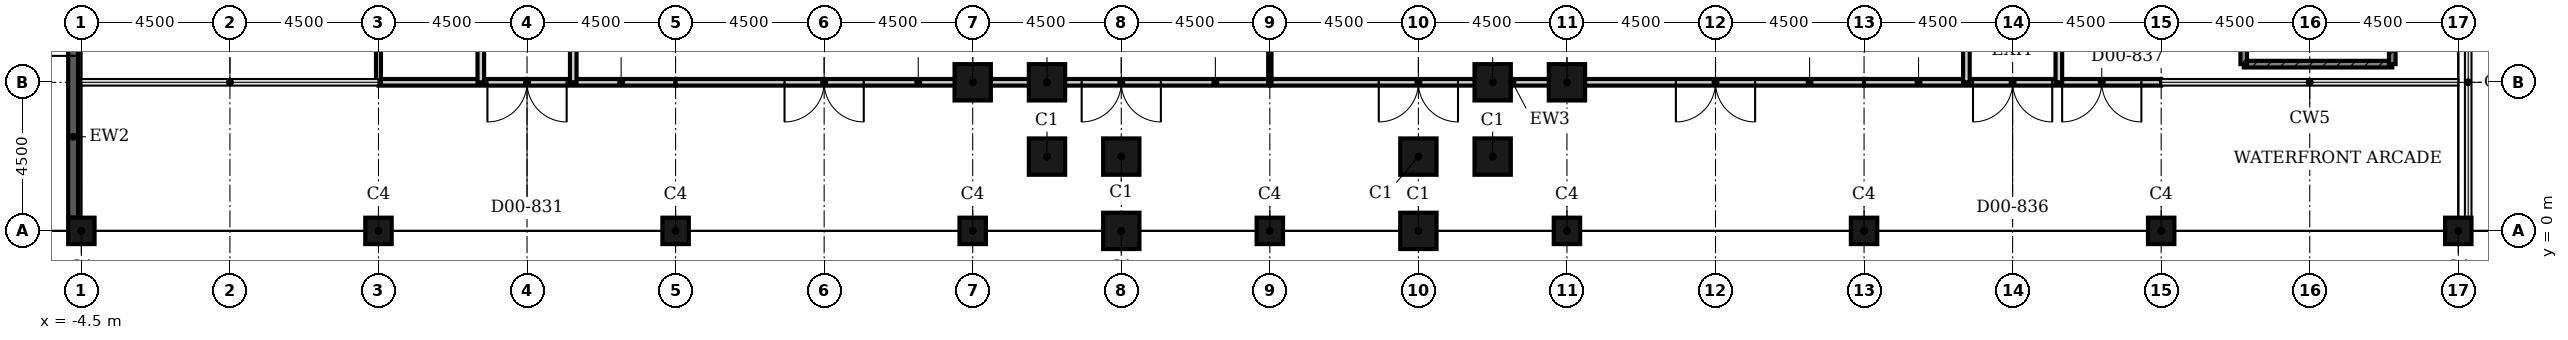
"""IFC4 building model, lengths in metres.
Left out: names, types, materials, properties, quantities, classifications, styles, units other than length and angle.
Written with IfcOpenShell. Run it as: python <this file> out.ifc"""

import sys

from ifc_helpers import new_model, si_unit, direction, frame, frame_2d, origin, origin_2d, place, context, subcontext, project, spatial, rectangle, hollow_rectangle, extrude, element, fill, save


model = new_model("IFC4")
c1 = context("Model", 3, precision=1e-05, world=origin(), true_north=direction((0.0, 1.0)))
c2 = subcontext(c1, "Body", "Model", "MODEL_VIEW")
j1 = project(units=[si_unit("LENGTHUNIT", "METRE"), si_unit("PLANEANGLEUNIT", "RADIAN")], contexts=[c1])
p1 = place(None, origin())
s1 = spatial("IfcSite", under=j1, at=p1, CompositionType="ELEMENT")
p2 = place(p1, origin())
s2 = spatial("IfcBuilding", under=s1, at=p2, CompositionType="ELEMENT")
p3 = place(p2, origin())
s3 = spatial("IfcBuildingStorey", under=s2, at=p3, CompositionType="ELEMENT", Elevation=0.0)
for number, where, z_axis, x_axis in (
    (1, (22.5, 4.5, 0.0), (0.0, 0.0, 1.0), (1.0, 0.0, 0.0)),
    (2, (24.75, 4.5, 0.0), (0.0, 0.0, 1.0), (1.0, 0.0, 0.0)),
    (3, (24.75, 2.25, 0.0), (0.0, 0.0, 1.0), (1.0, 0.0, 0.0)),
    (4, (27.0, 2.25, 0.0), (0.0, 0.0, 1.0), (1.0, 0.0, 0.0)),
    (5, (27.0, 0.0, 0.0), (0.0, 0.0, 1.0), (1.0, 0.0, 0.0)),
    (6, (36.0, 0.0, 0.0), (0.0, 0.0, 1.0), (1.0, 0.0, 0.0)),
    (7, (36.0, 2.25, 0.0), (0.0, 0.0, 1.0), (1.0, 0.0, 0.0)),
    (8, (38.25, 2.25, 0.0), (0.0, 0.0, 1.0), (1.0, 0.0, 0.0)),
    (9, (38.25, 4.5, 0.0), (0.0, 0.0, 1.0), (1.0, 0.0, 0.0)),
    (10, (40.5, 4.5, 0.0), (0.0, 0.0, 1.0), (1.0, 0.0, 0.0)),
):
    element("IfcColumn", number, at=place(p3, frame(where, z_axis=z_axis, x_axis=x_axis)), inside=s3, PredefinedType="COLUMN", context=c2, shape_type="SweptSolid", body=[
        extrude(hollow_rectangle(XDim=1.1, YDim=1.1, WallThickness=0.036, at=origin_2d()), origin(), (0.0, 0.0, 1.0), 6.6),
    ])
for number, where, z_axis, x_axis in (
    (11, (-4.5, 0.0, 0.0), (0.0, 0.0, 1.0), (1.0, 0.0, 0.0)),
    (12, (4.5, 0.0, 0.0), (0.0, 0.0, 1.0), (1.0, 0.0, 0.0)),
    (13, (13.5, 0.0, 0.0), (0.0, 0.0, 1.0), (1.0, 0.0, 0.0)),
    (14, (22.5, 0.0, 0.0), (0.0, 0.0, 1.0), (1.0, 0.0, 0.0)),
    (15, (31.5, 0.0, 0.0), (0.0, 0.0, 1.0), (1.0, 0.0, 0.0)),
    (16, (40.5, 0.0, 0.0), (0.0, 0.0, 1.0), (1.0, 0.0, 0.0)),
    (17, (49.5, 0.0, 0.0), (0.0, 0.0, 1.0), (1.0, 0.0, 0.0)),
    (18, (58.5, 0.0, 0.0), (0.0, 0.0, 1.0), (1.0, 0.0, 0.0)),
    (19, (67.5, 0.0, 0.0), (0.0, 0.0, 1.0), (1.0, 0.0, 0.0)),
):
    element("IfcColumn", number, at=place(p3, frame(where, z_axis=z_axis, x_axis=x_axis)), inside=s3, PredefinedType="COLUMN", context=c2, shape_type="SweptSolid", body=[
        extrude(hollow_rectangle(XDim=0.8, YDim=0.8, WallThickness=0.025, at=origin_2d()), origin(), (0.0, 0.0, 1.0), 6.6),
    ])
p4 = place(p3, frame((-4.75, 0.4, 0.0), z_axis=(0.0, 0.0, 1.0), x_axis=(0.0, 1.0, 0.0)))
e20 = element("IfcWall", 20, at=p4, inside=s3, PredefinedType="SOLIDWALL", context=c2, shape_type="SweptSolid", body=[
    extrude(rectangle(XDim=8.2, YDim=0.3, at=frame_2d((4.1, 0.0))), origin(), (0.0, 0.0, 1.0), 6.6),
])
p5 = place(p4, frame((4.9, 0.0, 0.0)))
e21 = element("IfcOpeningElement", 21, at=p5, cuts=e20, PredefinedType="OPENING", context=c2, shape_type="SweptSolid", body=[
    extrude(rectangle(XDim=2.4, YDim=2.4, at=frame_2d((1.2, 1.2))), frame((0.0, 0.16, 0.0), z_axis=(0.0, -1.0, 0.0), x_axis=(1.0, 0.0, 0.0)), (0.0, 0.0, 1.0), 0.32),
])
p6 = place(p3, frame((13.5, 4.5, 0.0), z_axis=(0.0, 0.0, 1.0), x_axis=(-1.0, 0.0, 0.0)))
e22 = element("IfcWall", 22, at=p6, inside=s3, PredefinedType="SOLIDWALL", context=c2, shape_type="SweptSolid", body=[
    extrude(rectangle(XDim=9.0, YDim=0.2, at=frame_2d((4.5, 0.0))), origin(), (0.0, 0.0, 1.0), 6.25),
])
p7 = place(p6, frame((3.3, 0.0, 0.0)))
e23 = element("IfcOpeningElement", 23, at=p7, cuts=e22, PredefinedType="OPENING", context=c2, shape_type="SweptSolid", body=[
    extrude(rectangle(XDim=2.4, YDim=2.4, at=frame_2d((1.2, 1.2))), frame((0.0, 0.11, 0.0), z_axis=(0.0, -1.0, 0.0), x_axis=(1.0, 0.0, 0.0)), (0.0, 0.0, 1.0), 0.22),
])
p8 = place(p3, frame((22.5, 4.5, 0.0), z_axis=(0.0, 0.0, 1.0), x_axis=(-1.0, 0.0, 0.0)))
e24 = element("IfcWall", 24, at=p8, inside=s3, PredefinedType="SOLIDWALL", context=c2, shape_type="SweptSolid", body=[
    extrude(rectangle(XDim=9.0, YDim=0.2, at=frame_2d((4.5, 0.0))), origin(), (0.0, 0.0, 1.0), 6.25),
])
p9 = place(p8, frame((3.3, 0.0, 0.0)))
e25 = element("IfcOpeningElement", 25, at=p9, cuts=e24, PredefinedType="OPENING", context=c2, shape_type="SweptSolid", body=[
    extrude(rectangle(XDim=2.4, YDim=2.4, at=frame_2d((1.2, 1.2))), frame((0.0, 0.11, 0.0), z_axis=(0.0, -1.0, 0.0), x_axis=(1.0, 0.0, 0.0)), (0.0, 0.0, 1.0), 0.22),
])
p10 = place(p3, frame((31.5, 4.5, 0.0), z_axis=(0.0, 0.0, 1.0), x_axis=(-1.0, 0.0, 0.0)))
e26 = element("IfcWall", 26, at=p10, inside=s3, PredefinedType="SOLIDWALL", context=c2, shape_type="SweptSolid", body=[
    extrude(rectangle(XDim=9.0, YDim=0.2, at=frame_2d((4.5, 0.0))), origin(), (0.0, 0.0, 1.0), 6.25),
])
p11 = place(p10, frame((3.3, 0.0, 0.0)))
e27 = element("IfcOpeningElement", 27, at=p11, cuts=e26, PredefinedType="OPENING", context=c2, shape_type="SweptSolid", body=[
    extrude(rectangle(XDim=2.4, YDim=2.4, at=frame_2d((1.2, 1.2))), frame((0.0, 0.11, 0.0), z_axis=(0.0, -1.0, 0.0), x_axis=(1.0, 0.0, 0.0)), (0.0, 0.0, 1.0), 0.22),
])
p12 = place(p3, frame((40.5, 4.5, 0.0), z_axis=(0.0, 0.0, 1.0), x_axis=(-1.0, 0.0, 0.0)))
e28 = element("IfcWall", 28, at=p12, inside=s3, PredefinedType="SOLIDWALL", context=c2, shape_type="SweptSolid", body=[
    extrude(rectangle(XDim=9.0, YDim=0.2, at=frame_2d((4.5, 0.0))), origin(), (0.0, 0.0, 1.0), 6.25),
])
p13 = place(p12, frame((3.3, 0.0, 0.0)))
e29 = element("IfcOpeningElement", 29, at=p13, cuts=e28, PredefinedType="OPENING", context=c2, shape_type="SweptSolid", body=[
    extrude(rectangle(XDim=2.4, YDim=2.4, at=frame_2d((1.2, 1.2))), frame((0.0, 0.11, 0.0), z_axis=(0.0, -1.0, 0.0), x_axis=(1.0, 0.0, 0.0)), (0.0, 0.0, 1.0), 0.22),
])
p14 = place(p3, frame((49.5, 4.5, 0.0), z_axis=(0.0, 0.0, 1.0), x_axis=(-1.0, 0.0, 0.0)))
e30 = element("IfcWall", 30, at=p14, inside=s3, PredefinedType="SOLIDWALL", context=c2, shape_type="SweptSolid", body=[
    extrude(rectangle(XDim=9.0, YDim=0.2, at=frame_2d((4.5, 0.0))), origin(), (0.0, 0.0, 1.0), 6.25),
])
p15 = place(p14, frame((3.3, 0.0, 0.0)))
e31 = element("IfcOpeningElement", 31, at=p15, cuts=e30, PredefinedType="OPENING", context=c2, shape_type="SweptSolid", body=[
    extrude(rectangle(XDim=2.4, YDim=2.4, at=frame_2d((1.2, 1.2))), frame((0.0, 0.11, 0.0), z_axis=(0.0, -1.0, 0.0), x_axis=(1.0, 0.0, 0.0)), (0.0, 0.0, 1.0), 0.22),
])
p16 = place(p3, frame((58.5, 4.5, 0.0), z_axis=(0.0, 0.0, 1.0), x_axis=(-1.0, 0.0, 0.0)))
e32 = element("IfcWall", 32, at=p16, inside=s3, PredefinedType="SOLIDWALL", context=c2, shape_type="SweptSolid", body=[
    extrude(rectangle(XDim=9.0, YDim=0.2, at=frame_2d((4.5, 0.0))), origin(), (0.0, 0.0, 1.0), 6.25),
])
p17 = place(p16, frame((3.3, 0.0, 0.0)))
e33 = element("IfcOpeningElement", 33, at=p17, cuts=e32, PredefinedType="OPENING", context=c2, shape_type="SweptSolid", body=[
    extrude(rectangle(XDim=2.4, YDim=2.4, at=frame_2d((1.2, 1.2))), frame((0.0, 0.11, 0.0), z_axis=(0.0, -1.0, 0.0), x_axis=(1.0, 0.0, 0.0)), (0.0, 0.0, 1.0), 0.22),
])
p18 = place(p16, frame((0.6, 0.0, 0.0)))
e34 = element("IfcOpeningElement", 34, at=p18, cuts=e32, PredefinedType="OPENING", context=c2, shape_type="SweptSolid", body=[
    extrude(rectangle(XDim=2.4, YDim=2.4, at=frame_2d((1.2, 1.2))), frame((0.0, 0.11, 0.0), z_axis=(0.0, -1.0, 0.0), x_axis=(1.0, 0.0, 0.0)), (0.0, 0.0, 1.0), 0.22),
])
p19 = place(p3, frame((4.5, 4.5, 0.0), z_axis=(0.0, 0.0, 1.0), x_axis=(0.0, 1.0, 0.0)))
e35 = element("IfcWall", 35, at=p19, inside=s3, PredefinedType="PARTITIONING", context=c2, shape_type="SweptSolid", body=[
    extrude(rectangle(XDim=18.0, YDim=0.15, at=frame_2d((9.0, 0.0))), origin(), (0.0, 0.0, 1.0), 6.25),
])
p20 = place(p19, frame((8.25, 0.0, 0.0)))
e36 = element("IfcOpeningElement", 36, at=p20, cuts=e35, PredefinedType="OPENING", context=c2, shape_type="SweptSolid", body=[
    extrude(rectangle(XDim=1.5, YDim=2.4, at=frame_2d((0.75, 1.2))), frame((0.0, 0.085, 0.0), z_axis=(0.0, -1.0, 0.0), x_axis=(1.0, 0.0, 0.0)), (0.0, 0.0, 1.0), 0.17),
])
p21 = place(p3, frame((31.5, 4.5, 0.0), z_axis=(0.0, 0.0, 1.0), x_axis=(0.0, 1.0, 0.0)))
e37 = element("IfcWall", 37, at=p21, inside=s3, PredefinedType="PARTITIONING", context=c2, shape_type="SweptSolid", body=[
    extrude(rectangle(XDim=9.0, YDim=0.1, at=frame_2d((4.5, 0.0))), origin(), (0.0, 0.0, 1.0), 6.25),
])
for number, where, z_axis, x_axis in (
    (38, (10.4, 4.5, 0.0), (0.0, 0.0, 1.0), (0.0, 1.0, 0.0)),
    (39, (52.6, 4.5, 0.0), (0.0, 0.0, 1.0), (0.0, 1.0, 0.0)),
    (40, (55.4, 4.5, 0.0), (0.0, 0.0, 1.0), (0.0, 1.0, 0.0)),
    (41, (7.6, 4.5, 0.0), (0.0, 0.0, 1.0), (0.0, 1.0, 0.0)),
):
    element("IfcWall", number, at=place(p3, frame(where, z_axis=z_axis, x_axis=x_axis)), inside=s3, PredefinedType="PARTITIONING", context=c2, shape_type="SweptSolid", body=[
        extrude(rectangle(XDim=7.0, YDim=0.2, at=frame_2d((3.5, 0.0))), origin(), (0.0, 0.0, 1.0), 6.25),
    ])
p22 = place(p3, frame((61.0, 5.05, 0.0), z_axis=(0.0, 0.0, 1.0), x_axis=(1.0, 0.0, 0.0)))
e42 = element("IfcWall", 42, at=p22, inside=s3, PredefinedType="SHEAR", context=c2, shape_type="SweptSolid", body=[
    extrude(rectangle(XDim=4.5, YDim=0.2, at=frame_2d((2.25, 0.0))), origin(), (0.0, 0.0, 1.0), 6.25),
])
for number, where, z_axis, x_axis in (
    (43, (61.0, 5.05, 0.0), (0.0, 0.0, 1.0), (0.0, 1.0, 0.0)),
    (44, (65.5, 5.05, 0.0), (0.0, 0.0, 1.0), (0.0, 1.0, 0.0)),
):
    element("IfcWall", number, at=place(p3, frame(where, z_axis=z_axis, x_axis=x_axis)), inside=s3, PredefinedType="SHEAR", context=c2, shape_type="SweptSolid", body=[
        extrude(rectangle(XDim=8.45, YDim=0.2, at=frame_2d((4.225, 0.0))), origin(), (0.0, 0.0, 1.0), 6.25),
    ])
p23 = place(p5, origin())
e45 = element("IfcDoor", 45, at=p23, inside=s3, OperationType="DOUBLE_DOOR_SINGLE_SWING", PredefinedType="DOOR", context=c2, shape_type="SweptSolid", body=[
    extrude(rectangle(XDim=2.4, YDim=2.4, at=frame_2d((1.2, 1.2))), frame((0.0, 0.025, 0.0), z_axis=(0.0, -1.0, 0.0), x_axis=(1.0, 0.0, 0.0)), (0.0, 0.0, 1.0), 0.05),
])
fill(e21, e45)
p24 = place(p7, origin())
e46 = element("IfcDoor", 46, at=p24, inside=s3, OperationType="DOUBLE_DOOR_SINGLE_SWING", PredefinedType="DOOR", context=c2, shape_type="SweptSolid", body=[
    extrude(rectangle(XDim=2.4, YDim=2.4, at=frame_2d((1.2, 1.2))), frame((0.0, 0.025, 0.0), z_axis=(0.0, -1.0, 0.0), x_axis=(1.0, 0.0, 0.0)), (0.0, 0.0, 1.0), 0.05),
])
fill(e23, e46)
p25 = place(p9, origin())
e47 = element("IfcDoor", 47, at=p25, inside=s3, OperationType="DOUBLE_DOOR_SINGLE_SWING", PredefinedType="DOOR", context=c2, shape_type="SweptSolid", body=[
    extrude(rectangle(XDim=2.4, YDim=2.4, at=frame_2d((1.2, 1.2))), frame((0.0, 0.025, 0.0), z_axis=(0.0, -1.0, 0.0), x_axis=(1.0, 0.0, 0.0)), (0.0, 0.0, 1.0), 0.05),
])
fill(e25, e47)
p26 = place(p11, origin())
e48 = element("IfcDoor", 48, at=p26, inside=s3, OperationType="DOUBLE_DOOR_SINGLE_SWING", PredefinedType="DOOR", context=c2, shape_type="SweptSolid", body=[
    extrude(rectangle(XDim=2.4, YDim=2.4, at=frame_2d((1.2, 1.2))), frame((0.0, 0.025, 0.0), z_axis=(0.0, -1.0, 0.0), x_axis=(1.0, 0.0, 0.0)), (0.0, 0.0, 1.0), 0.05),
])
fill(e27, e48)
p27 = place(p13, origin())
e49 = element("IfcDoor", 49, at=p27, inside=s3, OperationType="DOUBLE_DOOR_SINGLE_SWING", PredefinedType="DOOR", context=c2, shape_type="SweptSolid", body=[
    extrude(rectangle(XDim=2.4, YDim=2.4, at=frame_2d((1.2, 1.2))), frame((0.0, 0.025, 0.0), z_axis=(0.0, -1.0, 0.0), x_axis=(1.0, 0.0, 0.0)), (0.0, 0.0, 1.0), 0.05),
])
fill(e29, e49)
p28 = place(p15, origin())
e50 = element("IfcDoor", 50, at=p28, inside=s3, OperationType="DOUBLE_DOOR_SINGLE_SWING", PredefinedType="DOOR", context=c2, shape_type="SweptSolid", body=[
    extrude(rectangle(XDim=2.4, YDim=2.4, at=frame_2d((1.2, 1.2))), frame((0.0, 0.025, 0.0), z_axis=(0.0, -1.0, 0.0), x_axis=(1.0, 0.0, 0.0)), (0.0, 0.0, 1.0), 0.05),
])
fill(e31, e50)
p29 = place(p17, origin())
e51 = element("IfcDoor", 51, at=p29, inside=s3, OperationType="DOUBLE_DOOR_SINGLE_SWING", PredefinedType="DOOR", context=c2, shape_type="SweptSolid", body=[
    extrude(rectangle(XDim=2.4, YDim=2.4, at=frame_2d((1.2, 1.2))), frame((0.0, 0.025, 0.0), z_axis=(0.0, -1.0, 0.0), x_axis=(1.0, 0.0, 0.0)), (0.0, 0.0, 1.0), 0.05),
])
fill(e33, e51)
p30 = place(p18, origin())
e52 = element("IfcDoor", 52, at=p30, inside=s3, OperationType="DOUBLE_DOOR_SINGLE_SWING", PredefinedType="DOOR", context=c2, shape_type="SweptSolid", body=[
    extrude(rectangle(XDim=2.4, YDim=2.4, at=frame_2d((1.2, 1.2))), frame((0.0, 0.025, 0.0), z_axis=(0.0, -1.0, 0.0), x_axis=(1.0, 0.0, 0.0)), (0.0, 0.0, 1.0), 0.05),
])
fill(e34, e52)
save(model, sys.argv[1])
